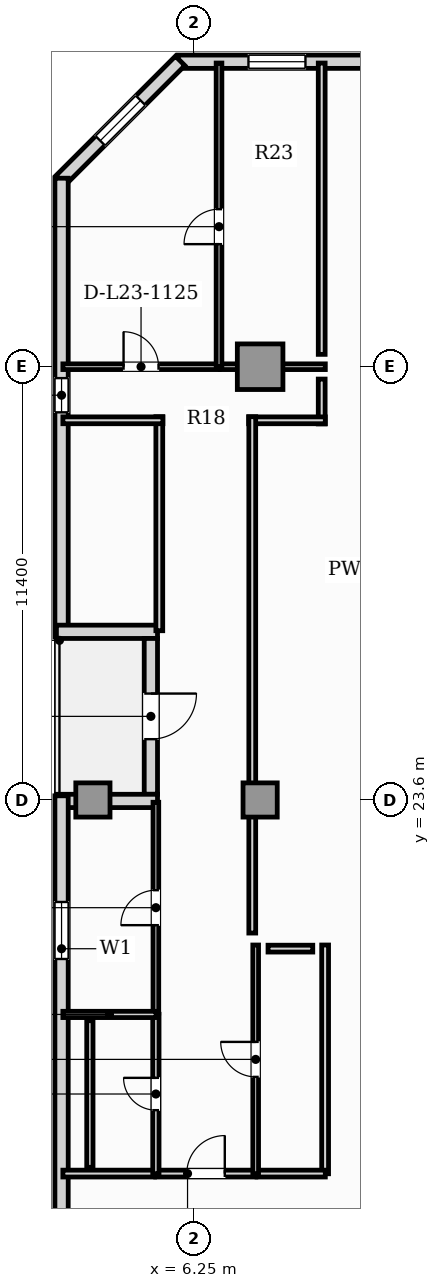
"""IFC4 building model, lengths in metres.
Left out: names, types, materials, properties, quantities, classifications, styles, units other than length and angle.
Written with IfcOpenShell. Run it as: python <this file> out.ifc"""

import sys

from ifc_helpers import new_model, si_unit, direction, frame, frame_2d, origin, origin_2d, place, context, subcontext, project, spatial, rectangle, hollow_rectangle, extrude, element, fill, save


model = new_model("IFC4")
c1 = context("Model", 3, precision=1e-05, world=origin(), true_north=direction((0.0, 1.0)))
c2 = subcontext(c1, "Body", "Model", "MODEL_VIEW")
j1 = project(units=[si_unit("LENGTHUNIT", "METRE"), si_unit("PLANEANGLEUNIT", "RADIAN")], contexts=[c1])
p1 = place(None, origin())
s1 = spatial("IfcSite", under=j1, at=p1, CompositionType="ELEMENT")
p2 = place(p1, origin())
s2 = spatial("IfcBuilding", under=s1, at=p2, CompositionType="ELEMENT")
p3 = place(p2, frame((0.0, 0.0, 96.45)))
s3 = spatial("IfcBuildingStorey", under=s2, at=p3, CompositionType="ELEMENT", Elevation=96.45)
p4 = place(p3, frame((8.0, 35.0, 0.0), z_axis=(0.0, 0.0, 1.0), x_axis=(1.0, 0.0, 0.0)))
e1 = element("IfcColumn", 1, at=p4, inside=s3, PredefinedType="USERDEFINED", context=c2, shape_type="SweptSolid", body=[
    extrude(hollow_rectangle(XDim=1.2, YDim=1.2, WallThickness=0.07, at=origin_2d()), origin(), (0.0, 0.0, 1.0), 3.85),
])
for number, where, z_axis, x_axis in (
    (2, (3.6, 23.6, 0.0), (0.0, 0.0, 1.0), (1.0, 0.0, 0.0)),
    (3, (8.0, 23.6, 0.0), (0.0, 0.0, 1.0), (1.0, 0.0, 0.0)),
):
    element("IfcColumn", number, at=place(p3, frame(where, z_axis=z_axis, x_axis=x_axis)), inside=s3, PredefinedType="COLUMN", context=c2, shape_type="SweptSolid", body=[
        extrude(rectangle(XDim=0.9, YDim=0.9, at=origin_2d()), origin(), (0.0, 0.0, 1.0), 3.85),
    ])
p5 = place(p3, frame((51.66, 43.025, 0.0), z_axis=(0.0, 0.0, 1.0), x_axis=(-1.0, 0.0, 0.0)))
e4 = element("IfcWall", 4, at=p5, inside=s3, PredefinedType="SOLIDWALL", context=c2, shape_type="SweptSolid", body=[
    extrude(rectangle(XDim=45.82, YDim=0.35, at=frame_2d((22.91, 0.0))), origin(), (0.0, 0.0, 1.0), 3.6),
])
p6 = place(p5, frame((42.468, 0.0, 0.9)))
e5 = element("IfcOpeningElement", 5, at=p6, cuts=e4, PredefinedType="OPENING", context=c2, shape_type="SweptSolid", body=[
    extrude(rectangle(XDim=1.5, YDim=1.95, at=frame_2d((0.75, 0.975))), frame((0.0, 0.185, 0.0), z_axis=(0.0, -1.0, 0.0), x_axis=(1.0, 0.0, 0.0)), (0.0, 0.0, 1.0), 0.37),
])
p7 = place(p5, frame((1.853, 0.0, 0.9)))
e6 = element("IfcOpeningElement", 6, at=p7, cuts=e4, PredefinedType="OPENING", context=c2, shape_type="SweptSolid", body=[
    extrude(rectangle(XDim=1.5, YDim=1.95, at=frame_2d((0.75, 0.975))), frame((0.0, 0.185, 0.0), z_axis=(0.0, -1.0, 0.0), x_axis=(1.0, 0.0, 0.0)), (0.0, 0.0, 1.0), 0.37),
])
p8 = place(p5, frame((36.578, 0.0, 0.9)))
e7 = element("IfcOpeningElement", 7, at=p8, cuts=e4, PredefinedType="OPENING", context=c2, shape_type="SweptSolid", body=[
    extrude(rectangle(XDim=1.5, YDim=1.95, at=frame_2d((0.75, 0.975))), frame((0.0, 0.185, 0.0), z_axis=(0.0, -1.0, 0.0), x_axis=(1.0, 0.0, 0.0)), (0.0, 0.0, 1.0), 0.37),
])
p9 = place(p5, frame((31.898, 0.0, 0.9)))
e8 = element("IfcOpeningElement", 8, at=p9, cuts=e4, PredefinedType="OPENING", context=c2, shape_type="SweptSolid", body=[
    extrude(rectangle(XDim=1.5, YDim=1.95, at=frame_2d((0.75, 0.975))), frame((0.0, 0.185, 0.0), z_axis=(0.0, -1.0, 0.0), x_axis=(1.0, 0.0, 0.0)), (0.0, 0.0, 1.0), 0.37),
])
p10 = place(p5, frame((27.837, 0.0, 0.9)))
e9 = element("IfcOpeningElement", 9, at=p10, cuts=e4, PredefinedType="OPENING", context=c2, shape_type="SweptSolid", body=[
    extrude(rectangle(XDim=1.5, YDim=1.95, at=frame_2d((0.75, 0.975))), frame((0.0, 0.185, 0.0), z_axis=(0.0, -1.0, 0.0), x_axis=(1.0, 0.0, 0.0)), (0.0, 0.0, 1.0), 0.37),
])
p11 = place(p5, frame((24.236, 0.0, 0.9)))
e10 = element("IfcOpeningElement", 10, at=p11, cuts=e4, PredefinedType="OPENING", context=c2, shape_type="SweptSolid", body=[
    extrude(rectangle(XDim=1.5, YDim=1.95, at=frame_2d((0.75, 0.975))), frame((0.0, 0.185, 0.0), z_axis=(0.0, -1.0, 0.0), x_axis=(1.0, 0.0, 0.0)), (0.0, 0.0, 1.0), 0.37),
])
p12 = place(p5, frame((19.927, 0.0, 0.9)))
e11 = element("IfcOpeningElement", 11, at=p12, cuts=e4, PredefinedType="OPENING", context=c2, shape_type="SweptSolid", body=[
    extrude(rectangle(XDim=1.5, YDim=1.95, at=frame_2d((0.75, 0.975))), frame((0.0, 0.185, 0.0), z_axis=(0.0, -1.0, 0.0), x_axis=(1.0, 0.0, 0.0)), (0.0, 0.0, 1.0), 0.37),
])
p13 = place(p5, frame((15.381, 0.0, 0.9)))
e12 = element("IfcOpeningElement", 12, at=p13, cuts=e4, PredefinedType="OPENING", context=c2, shape_type="SweptSolid", body=[
    extrude(rectangle(XDim=1.5, YDim=1.95, at=frame_2d((0.75, 0.975))), frame((0.0, 0.185, 0.0), z_axis=(0.0, -1.0, 0.0), x_axis=(1.0, 0.0, 0.0)), (0.0, 0.0, 1.0), 0.37),
])
p14 = place(p5, frame((11.477, 0.0, 0.9)))
e13 = element("IfcOpeningElement", 13, at=p14, cuts=e4, PredefinedType="OPENING", context=c2, shape_type="SweptSolid", body=[
    extrude(rectangle(XDim=1.5, YDim=1.95, at=frame_2d((0.75, 0.975))), frame((0.0, 0.185, 0.0), z_axis=(0.0, -1.0, 0.0), x_axis=(1.0, 0.0, 0.0)), (0.0, 0.0, 1.0), 0.37),
])
p15 = place(p5, frame((7.445, 0.0, 0.9)))
e14 = element("IfcOpeningElement", 14, at=p15, cuts=e4, PredefinedType="OPENING", context=c2, shape_type="SweptSolid", body=[
    extrude(rectangle(XDim=1.5, YDim=1.95, at=frame_2d((0.75, 0.975))), frame((0.0, 0.185, 0.0), z_axis=(0.0, -1.0, 0.0), x_axis=(1.0, 0.0, 0.0)), (0.0, 0.0, 1.0), 0.37),
])
p16 = place(p3, frame((5.896, 43.048, 0.0), z_axis=(0.0, 0.0, 1.0), x_axis=(-0.707106781187, -0.707106781187, 0.0)))
e15 = element("IfcWall", 15, at=p16, inside=s3, PredefinedType="SOLIDWALL", context=c2, shape_type="SweptSolid", body=[
    extrude(rectangle(XDim=4.446, YDim=0.35, at=frame_2d((2.223, 0.0))), origin(), (0.0, 0.0, 1.0), 3.6),
])
p17 = place(p16, frame((1.473, 0.0, 0.9)))
e16 = element("IfcOpeningElement", 16, at=p17, cuts=e15, PredefinedType="OPENING", context=c2, shape_type="SweptSolid", body=[
    extrude(rectangle(XDim=1.5, YDim=1.95, at=frame_2d((0.75, 0.975))), frame((0.0, 0.185, 0.0), z_axis=(0.0, -1.0, 0.0), x_axis=(1.0, 0.0, 0.0)), (0.0, 0.0, 1.0), 0.37),
])
p18 = place(p3, frame((2.775, 39.96, 0.0), z_axis=(0.0, 0.0, 1.0), x_axis=(0.0, -1.0, 0.0)))
e17 = element("IfcWall", 17, at=p18, inside=s3, PredefinedType="SOLIDWALL", context=c2, shape_type="SweptSolid", body=[
    extrude(rectangle(XDim=12.07, YDim=0.35, at=frame_2d((6.035, 0.0))), origin(), (0.0, 0.0, 1.0), 3.6),
])
p19 = place(p18, frame((5.26, 0.0, 0.95)))
e18 = element("IfcOpeningElement", 18, at=p19, cuts=e17, PredefinedType="OPENING", context=c2, shape_type="SweptSolid", body=[
    extrude(rectangle(XDim=0.9, YDim=1.5, at=frame_2d((0.45, 0.75))), frame((0.0, 0.185, 0.0), z_axis=(0.0, -1.0, 0.0), x_axis=(1.0, 0.0, 0.0)), (0.0, 0.0, 1.0), 0.37),
])
p20 = place(p3, frame((2.64, 28.025, 0.0), z_axis=(0.0, 0.0, 1.0), x_axis=(1.0, 0.0, 0.0)))
e19 = element("IfcWall", 19, at=p20, inside=s3, PredefinedType="SOLIDWALL", context=c2, shape_type="SweptSolid", body=[
    extrude(rectangle(XDim=2.66, YDim=0.35, at=frame_2d((1.33, 0.0))), origin(), (0.0, 0.0, 1.0), 3.6),
])
p21 = place(p3, frame((5.125, 27.85, 0.0), z_axis=(0.0, 0.0, 1.0), x_axis=(0.0, -1.0, 0.0)))
e20 = element("IfcWall", 20, at=p21, inside=s3, PredefinedType="SOLIDWALL", context=c2, shape_type="SweptSolid", body=[
    extrude(rectangle(XDim=4.1, YDim=0.35, at=frame_2d((2.05, 0.0))), origin(), (0.0, 0.0, 1.0), 3.6),
])
p22 = place(p21, frame((1.45, 0.0, 0.0)))
e21 = element("IfcOpeningElement", 21, at=p22, cuts=e20, PredefinedType="OPENING", context=c2, shape_type="SweptSolid", body=[
    extrude(rectangle(XDim=1.2, YDim=2.2, at=frame_2d((0.6, 1.1))), frame((0.0, 0.185, 0.0), z_axis=(0.0, -1.0, 0.0), x_axis=(1.0, 0.0, 0.0)), (0.0, 0.0, 1.0), 0.37),
])
p23 = place(p3, frame((5.3, 23.575, 0.0), z_axis=(0.0, 0.0, 1.0), x_axis=(-1.0, 0.0, 0.0)))
e22 = element("IfcWall", 22, at=p23, inside=s3, PredefinedType="SOLIDWALL", context=c2, shape_type="SweptSolid", body=[
    extrude(rectangle(XDim=2.66, YDim=0.35, at=frame_2d((1.33, 0.0))), origin(), (0.0, 0.0, 1.0), 3.056),
])
p24 = place(p3, frame((2.775, 23.71, 0.0), z_axis=(0.0, 0.0, 1.0), x_axis=(0.0, -1.0, 0.0)))
e23 = element("IfcWall", 23, at=p24, inside=s3, PredefinedType="SOLIDWALL", context=c2, shape_type="SweptSolid", body=[
    extrude(rectangle(XDim=20.47, YDim=0.35, at=frame_2d((10.235, 0.0))), origin(), (0.0, 0.0, 1.0), 3.6),
])
p25 = place(p24, frame((2.794, 0.0, 0.9)))
e24 = element("IfcOpeningElement", 24, at=p25, cuts=e23, PredefinedType="OPENING", context=c2, shape_type="SweptSolid", body=[
    extrude(rectangle(XDim=1.5, YDim=1.95, at=frame_2d((0.75, 0.975))), frame((0.0, 0.185, 0.0), z_axis=(0.0, -1.0, 0.0), x_axis=(1.0, 0.0, 0.0)), (0.0, 0.0, 1.0), 0.37),
])
p26 = place(p3, frame((5.252, 13.77, 0.0), z_axis=(0.0, 0.0, 1.0), x_axis=(1.0, 0.0, 0.0)))
e25 = element("IfcWall", 25, at=p26, inside=s3, PredefinedType="PARTITIONING", context=c2, shape_type="SweptSolid", body=[
    extrude(rectangle(XDim=2.636, YDim=0.18, at=frame_2d((1.318, 0.0))), origin(), (0.0, 0.0, 1.0), 3.6),
])
p27 = place(p26, frame((0.818, 0.0, 0.0)))
e26 = element("IfcOpeningElement", 26, at=p27, cuts=e25, PredefinedType="OPENING", context=c2, shape_type="SweptSolid", body=[
    extrude(rectangle(XDim=1.0, YDim=2.15, at=frame_2d((0.5, 1.075))), frame((0.0, 0.1, 0.0), z_axis=(0.0, -1.0, 0.0), x_axis=(1.0, 0.0, 0.0)), (0.0, 0.0, 1.0), 0.2),
])
p28 = place(p3, frame((2.81, 13.77, 0.0), z_axis=(0.0, 0.0, 1.0), x_axis=(1.0, 0.0, 0.0)))
e27 = element("IfcWall", 27, at=p28, inside=s3, PredefinedType="PARTITIONING", context=c2, shape_type="SweptSolid", body=[
    extrude(rectangle(XDim=2.412, YDim=0.18, at=frame_2d((1.206, 0.0))), origin(), (0.0, 0.0, 1.0), 3.6),
])
p29 = place(p3, frame((9.71, 13.765, 0.0), z_axis=(0.0, 0.0, 1.0), x_axis=(0.0, 1.0, 0.0)))
e28 = element("IfcWall", 28, at=p29, inside=s3, PredefinedType="PARTITIONING", context=c2, shape_type="SweptSolid", body=[
    extrude(rectangle(XDim=6.019, YDim=0.18, at=frame_2d((3.009, 0.0))), origin(), (0.0, 0.0, 1.0), 3.6),
])
p30 = place(p3, frame((7.918, 13.77, 0.0), z_axis=(0.0, 0.0, 1.0), x_axis=(1.0, 0.0, 0.0)))
e29 = element("IfcWall", 29, at=p30, inside=s3, PredefinedType="PARTITIONING", context=c2, shape_type="SweptSolid", body=[
    extrude(rectangle(XDim=1.797, YDim=0.18, at=frame_2d((0.898, 0.0))), origin(), (0.0, 0.0, 1.0), 3.6),
])
p31 = place(p3, frame((5.257, 13.765, 0.0), z_axis=(0.0, 0.0, 1.0), x_axis=(0.0, 1.0, 0.0)))
e30 = element("IfcWall", 30, at=p31, inside=s3, PredefinedType="PLUMBINGWALL", context=c2, shape_type="SweptSolid", body=[
    extrude(rectangle(XDim=4.198, YDim=0.165, at=frame_2d((2.099, 0.0))), origin(), (0.0, 0.0, 1.0), 3.6),
])
p32 = place(p31, frame((1.674, 0.0, 0.0)))
e31 = element("IfcOpeningElement", 31, at=p32, cuts=e30, PredefinedType="OPENING", context=c2, shape_type="SweptSolid", body=[
    extrude(rectangle(XDim=0.85, YDim=2.1, at=frame_2d((0.425, 1.05))), frame((0.0, 0.093, 0.0), z_axis=(0.0, -1.0, 0.0), x_axis=(1.0, 0.0, 0.0)), (0.0, 0.0, 1.0), 0.185),
])
p33 = place(p3, frame((5.257, 17.992, 0.0), z_axis=(0.0, 0.0, 1.0), x_axis=(0.0, 1.0, 0.0)))
e32 = element("IfcWall", 32, at=p33, inside=s3, PredefinedType="PARTITIONING", context=c2, shape_type="SweptSolid", body=[
    extrude(rectangle(XDim=5.548, YDim=0.15, at=frame_2d((2.774, 0.0))), origin(), (0.0, 0.0, 1.0), 3.6),
])
p34 = place(p33, frame((2.314, 0.0, 0.0)))
e33 = element("IfcOpeningElement", 33, at=p34, cuts=e32, PredefinedType="OPENING", context=c2, shape_type="SweptSolid", body=[
    extrude(rectangle(XDim=0.92, YDim=2.1, at=frame_2d((0.46, 1.05))), frame((0.0, 0.085, 0.0), z_axis=(0.0, -1.0, 0.0), x_axis=(1.0, 0.0, 0.0)), (0.0, 0.0, 1.0), 0.17),
])
p35 = place(p3, frame((7.883, 13.765, 0.0), z_axis=(0.0, 0.0, 1.0), x_axis=(0.0, 1.0, 0.0)))
e34 = element("IfcWall", 34, at=p35, inside=s3, PredefinedType="PARTITIONING", context=c2, shape_type="SweptSolid", body=[
    extrude(rectangle(XDim=6.019, YDim=0.15, at=frame_2d((3.009, 0.0))), origin(), (0.0, 0.0, 1.0), 3.056),
])
p36 = place(p35, frame((2.549, 0.0, 0.0)))
e35 = element("IfcOpeningElement", 35, at=p36, cuts=e34, PredefinedType="OPENING", context=c2, shape_type="SweptSolid", body=[
    extrude(rectangle(XDim=0.92, YDim=2.1, at=frame_2d((0.46, 1.05))), frame((0.0, 0.085, 0.0), z_axis=(0.0, -1.0, 0.0), x_axis=(1.0, 0.0, 0.0)), (0.0, 0.0, 1.0), 0.17),
])
p37 = place(p3, frame((2.81, 35.0, 0.0), z_axis=(0.0, 0.0, 1.0), x_axis=(1.0, 0.0, 0.0)))
e36 = element("IfcWall", 36, at=p37, inside=s3, PredefinedType="PARTITIONING", context=c2, shape_type="SweptSolid", body=[
    extrude(rectangle(XDim=4.113, YDim=0.15, at=frame_2d((2.057, 0.0))), origin(), (0.0, 0.0, 1.0), 3.6),
])
p38 = place(p37, frame((1.597, 0.0, 0.0)))
e37 = element("IfcOpeningElement", 37, at=p38, cuts=e36, PredefinedType="OPENING", context=c2, shape_type="SweptSolid", body=[
    extrude(rectangle(XDim=0.92, YDim=2.1, at=frame_2d((0.46, 1.05))), frame((0.0, 0.085, 0.0), z_axis=(0.0, -1.0, 0.0), x_axis=(1.0, 0.0, 0.0)), (0.0, 0.0, 1.0), 0.17),
])
p39 = place(p3, frame((6.953, 35.0, 0.0), z_axis=(0.0, 0.0, 1.0), x_axis=(1.0, 0.0, 0.0)))
e38 = element("IfcWall", 38, at=p39, inside=s3, PredefinedType="PARTITIONING", context=c2, shape_type="SweptSolid", body=[
    extrude(rectangle(XDim=2.762, YDim=0.15, at=frame_2d((1.381, 0.0))), origin(), (0.0, 0.0, 1.0), 2.983),
])
p40 = place(p3, frame((2.81, 17.957, 0.0), z_axis=(0.0, 0.0, 1.0), x_axis=(1.0, 0.0, 0.0)))
e39 = element("IfcWall", 39, at=p40, inside=s3, PredefinedType="PLUMBINGWALL", context=c2, shape_type="SweptSolid", body=[
    extrude(rectangle(XDim=2.452, YDim=0.165, at=frame_2d((1.226, 0.0))), origin(), (0.0, 0.0, 1.0), 3.6),
])
p41 = place(p3, frame((6.918, 34.995, 0.0), z_axis=(0.0, 0.0, 1.0), x_axis=(0.0, 1.0, 0.0)))
e40 = element("IfcWall", 40, at=p41, inside=s3, PredefinedType="PARTITIONING", context=c2, shape_type="SweptSolid", body=[
    extrude(rectangle(XDim=7.995, YDim=0.15, at=frame_2d((3.998, 0.0))), origin(), (0.0, 0.0, 1.0), 3.6),
])
p42 = place(p41, frame((3.23, 0.0, 0.0)))
e41 = element("IfcOpeningElement", 41, at=p42, cuts=e40, PredefinedType="OPENING", context=c2, shape_type="SweptSolid", body=[
    extrude(rectangle(XDim=0.92, YDim=2.1, at=frame_2d((0.46, 1.05))), frame((0.0, 0.085, 0.0), z_axis=(0.0, -1.0, 0.0), x_axis=(1.0, 0.0, 0.0)), (0.0, 0.0, 1.0), 0.17),
])
p43 = place(p3, frame((5.347, 28.053, 0.0), z_axis=(0.0, 0.0, 1.0), x_axis=(0.0, 1.0, 0.0)))
e42 = element("IfcWall", 42, at=p43, inside=s3, PredefinedType="PARTITIONING", context=c2, shape_type="SweptSolid", body=[
    extrude(rectangle(XDim=5.632, YDim=0.18, at=frame_2d((2.816, 0.0))), origin(), (0.0, 0.0, 1.0), 3.6),
])
p44 = place(p3, frame((5.442, 33.59, 0.0), z_axis=(0.0, 0.0, 1.0), x_axis=(-1.0, 0.0, 0.0)))
e43 = element("IfcWall", 43, at=p44, inside=s3, PredefinedType="PARTITIONING", context=c2, shape_type="SweptSolid", body=[
    extrude(rectangle(XDim=2.632, YDim=0.18, at=frame_2d((1.316, 0.0))), origin(), (0.0, 0.0, 1.0), 3.6),
])
p45 = place(p3, frame((9.62, 34.675, 0.0), z_axis=(0.0, 0.0, 1.0), x_axis=(0.0, -1.0, 0.0)))
e44 = element("IfcWall", 44, at=p45, inside=s3, PredefinedType="PARTITIONING", context=c2, shape_type="SweptSolid", body=[
    extrude(rectangle(XDim=1.18, YDim=0.18, at=frame_2d((0.59, 0.0))), origin(), (0.0, 0.0, 1.0), 3.6),
])
p46 = place(p3, frame((9.715, 33.59, 0.0), z_axis=(0.0, 0.0, 1.0), x_axis=(-1.0, 0.0, 0.0)))
e45 = element("IfcWall", 45, at=p46, inside=s3, PredefinedType="PARTITIONING", context=c2, shape_type="SweptSolid", body=[
    extrude(rectangle(XDim=2.017, YDim=0.18, at=frame_2d((1.009, 0.0))), origin(), (0.0, 0.0, 1.0), 3.6),
])
p47 = place(p3, frame((7.793, 33.685, 0.0), z_axis=(0.0, 0.0, 1.0), x_axis=(0.0, -1.0, 0.0)))
e46 = element("IfcWall", 46, at=p47, inside=s3, PredefinedType="PARTITIONING", context=c2, shape_type="SweptSolid", body=[
    extrude(rectangle(XDim=13.586, YDim=0.18, at=frame_2d((6.793, 0.0))), origin(), (0.0, 0.0, 1.0), 3.056),
])
p48 = place(p3, frame((3.52, 13.935, 0.0), z_axis=(0.0, 0.0, 1.0), x_axis=(0.0, 1.0, 0.0)))
e47 = element("IfcWall", 47, at=p48, inside=s3, PredefinedType="PLUMBINGWALL", context=c2, shape_type="SweptSolid", body=[
    extrude(rectangle(XDim=3.857, YDim=0.165, at=frame_2d((1.929, 0.0))), origin(), (0.0, 0.0, 1.0), 3.6),
])
p49 = place(p3, frame((8.208, 19.689, 0.0), z_axis=(0.0, 0.0, 1.0), x_axis=(1.0, 0.0, 0.0)))
e48 = element("IfcWall", 48, at=p49, inside=s3, PredefinedType="PARTITIONING", context=c2, shape_type="SweptSolid", body=[
    extrude(rectangle(XDim=1.177, YDim=0.18, at=frame_2d((0.588, 0.0))), origin(), (0.0, 0.0, 1.0), 3.6),
])
p50 = place(p3, frame((9.62, 42.99, 0.0), z_axis=(0.0, 0.0, 1.0), x_axis=(0.0, -1.0, 0.0)))
e49 = element("IfcWall", 49, at=p50, inside=s3, PredefinedType="PARTITIONING", context=c2, shape_type="SweptSolid", body=[
    extrude(rectangle(XDim=7.665, YDim=0.18, at=frame_2d((3.833, 0.0))), origin(), (0.0, 0.0, 1.0), 3.6),
])
p51 = place(p22, frame((1.2, 0.0, 0.0), z_axis=(0.0, 0.0, 1.0), x_axis=(-1.0, 0.0, 0.0)))
e50 = element("IfcDoor", 50, at=p51, inside=s3, OperationType="SINGLE_SWING_RIGHT", PredefinedType="DOOR", context=c2, shape_type="SweptSolid", body=[
    extrude(rectangle(XDim=1.2, YDim=2.2, at=frame_2d((0.6, 1.1))), frame((0.0, 0.025, 0.0), z_axis=(0.0, -1.0, 0.0), x_axis=(1.0, 0.0, 0.0)), (0.0, 0.0, 1.0), 0.05),
])
fill(e21, e50)
p52 = place(p19, origin())
e51 = element("IfcWindow", 51, at=p52, inside=s3, PartitioningType="SINGLE_PANEL", PredefinedType="WINDOW", context=c2, shape_type="SweptSolid", body=[
    extrude(rectangle(XDim=0.9, YDim=1.5, at=frame_2d((0.45, 0.75))), frame((0.0, 0.03, 0.0), z_axis=(0.0, -1.0, 0.0), x_axis=(1.0, 0.0, 0.0)), (0.0, 0.0, 1.0), 0.06),
])
fill(e18, e51)
p53 = place(p25, origin())
e52 = element("IfcWindow", 52, at=p53, inside=s3, PartitioningType="SINGLE_PANEL", PredefinedType="WINDOW", context=c2, shape_type="SweptSolid", body=[
    extrude(rectangle(XDim=1.5, YDim=1.95, at=frame_2d((0.75, 0.975))), frame((0.0, 0.03, 0.0), z_axis=(0.0, -1.0, 0.0), x_axis=(1.0, 0.0, 0.0)), (0.0, 0.0, 1.0), 0.06),
])
fill(e24, e52)
p54 = place(p17, origin())
e53 = element("IfcWindow", 53, at=p54, inside=s3, PartitioningType="SINGLE_PANEL", PredefinedType="WINDOW", context=c2, shape_type="SweptSolid", body=[
    extrude(rectangle(XDim=1.5, YDim=1.95, at=frame_2d((0.75, 0.975))), frame((0.0, 0.03, 0.0), z_axis=(0.0, -1.0, 0.0), x_axis=(1.0, 0.0, 0.0)), (0.0, 0.0, 1.0), 0.06),
])
fill(e16, e53)
p55 = place(p6, origin())
e54 = element("IfcWindow", 54, at=p55, inside=s3, PartitioningType="SINGLE_PANEL", PredefinedType="WINDOW", context=c2, shape_type="SweptSolid", body=[
    extrude(rectangle(XDim=1.5, YDim=1.95, at=frame_2d((0.75, 0.975))), frame((0.0, 0.03, 0.0), z_axis=(0.0, -1.0, 0.0), x_axis=(1.0, 0.0, 0.0)), (0.0, 0.0, 1.0), 0.06),
])
fill(e5, e54)
p56 = place(p27, origin())
e55 = element("IfcDoor", 55, at=p56, inside=s3, OperationType="SINGLE_SWING_RIGHT", PredefinedType="DOOR", context=c2, shape_type="SweptSolid", body=[
    extrude(rectangle(XDim=1.0, YDim=2.15, at=frame_2d((0.5, 1.075))), frame((0.0, 0.025, 0.0), z_axis=(0.0, -1.0, 0.0), x_axis=(1.0, 0.0, 0.0)), (0.0, 0.0, 1.0), 0.05),
])
fill(e26, e55)
p57 = place(p32, origin())
e56 = element("IfcDoor", 56, at=p57, inside=s3, OperationType="SINGLE_SWING_RIGHT", PredefinedType="DOOR", context=c2, shape_type="SweptSolid", body=[
    extrude(rectangle(XDim=0.85, YDim=2.1, at=frame_2d((0.425, 1.05))), frame((0.0, 0.025, 0.0), z_axis=(0.0, -1.0, 0.0), x_axis=(1.0, 0.0, 0.0)), (0.0, 0.0, 1.0), 0.05),
])
fill(e31, e56)
p58 = place(p34, origin())
e57 = element("IfcDoor", 57, at=p58, inside=s3, OperationType="SINGLE_SWING_LEFT", PredefinedType="DOOR", context=c2, shape_type="SweptSolid", body=[
    extrude(rectangle(XDim=0.92, YDim=2.1, at=frame_2d((0.46, 1.05))), frame((0.0, 0.025, 0.0), z_axis=(0.0, -1.0, 0.0), x_axis=(1.0, 0.0, 0.0)), (0.0, 0.0, 1.0), 0.05),
])
fill(e33, e57)
p59 = place(p36, origin())
e58 = element("IfcDoor", 58, at=p59, inside=s3, OperationType="SINGLE_SWING_RIGHT", PredefinedType="DOOR", context=c2, shape_type="SweptSolid", body=[
    extrude(rectangle(XDim=0.92, YDim=2.1, at=frame_2d((0.46, 1.05))), frame((0.0, 0.025, 0.0), z_axis=(0.0, -1.0, 0.0), x_axis=(1.0, 0.0, 0.0)), (0.0, 0.0, 1.0), 0.05),
])
fill(e35, e58)
p60 = place(p38, origin())
e59 = element("IfcDoor", 59, at=p60, inside=s3, OperationType="SINGLE_SWING_LEFT", PredefinedType="DOOR", context=c2, shape_type="SweptSolid", body=[
    extrude(rectangle(XDim=0.92, YDim=2.1, at=frame_2d((0.46, 1.05))), frame((0.0, 0.025, 0.0), z_axis=(0.0, -1.0, 0.0), x_axis=(1.0, 0.0, 0.0)), (0.0, 0.0, 1.0), 0.05),
])
fill(e37, e59)
p61 = place(p42, origin())
e60 = element("IfcDoor", 60, at=p61, inside=s3, OperationType="SINGLE_SWING_LEFT", PredefinedType="DOOR", context=c2, shape_type="SweptSolid", body=[
    extrude(rectangle(XDim=0.92, YDim=2.1, at=frame_2d((0.46, 1.05))), frame((0.0, 0.025, 0.0), z_axis=(0.0, -1.0, 0.0), x_axis=(1.0, 0.0, 0.0)), (0.0, 0.0, 1.0), 0.05),
])
fill(e41, e60)
save(model, sys.argv[1])
